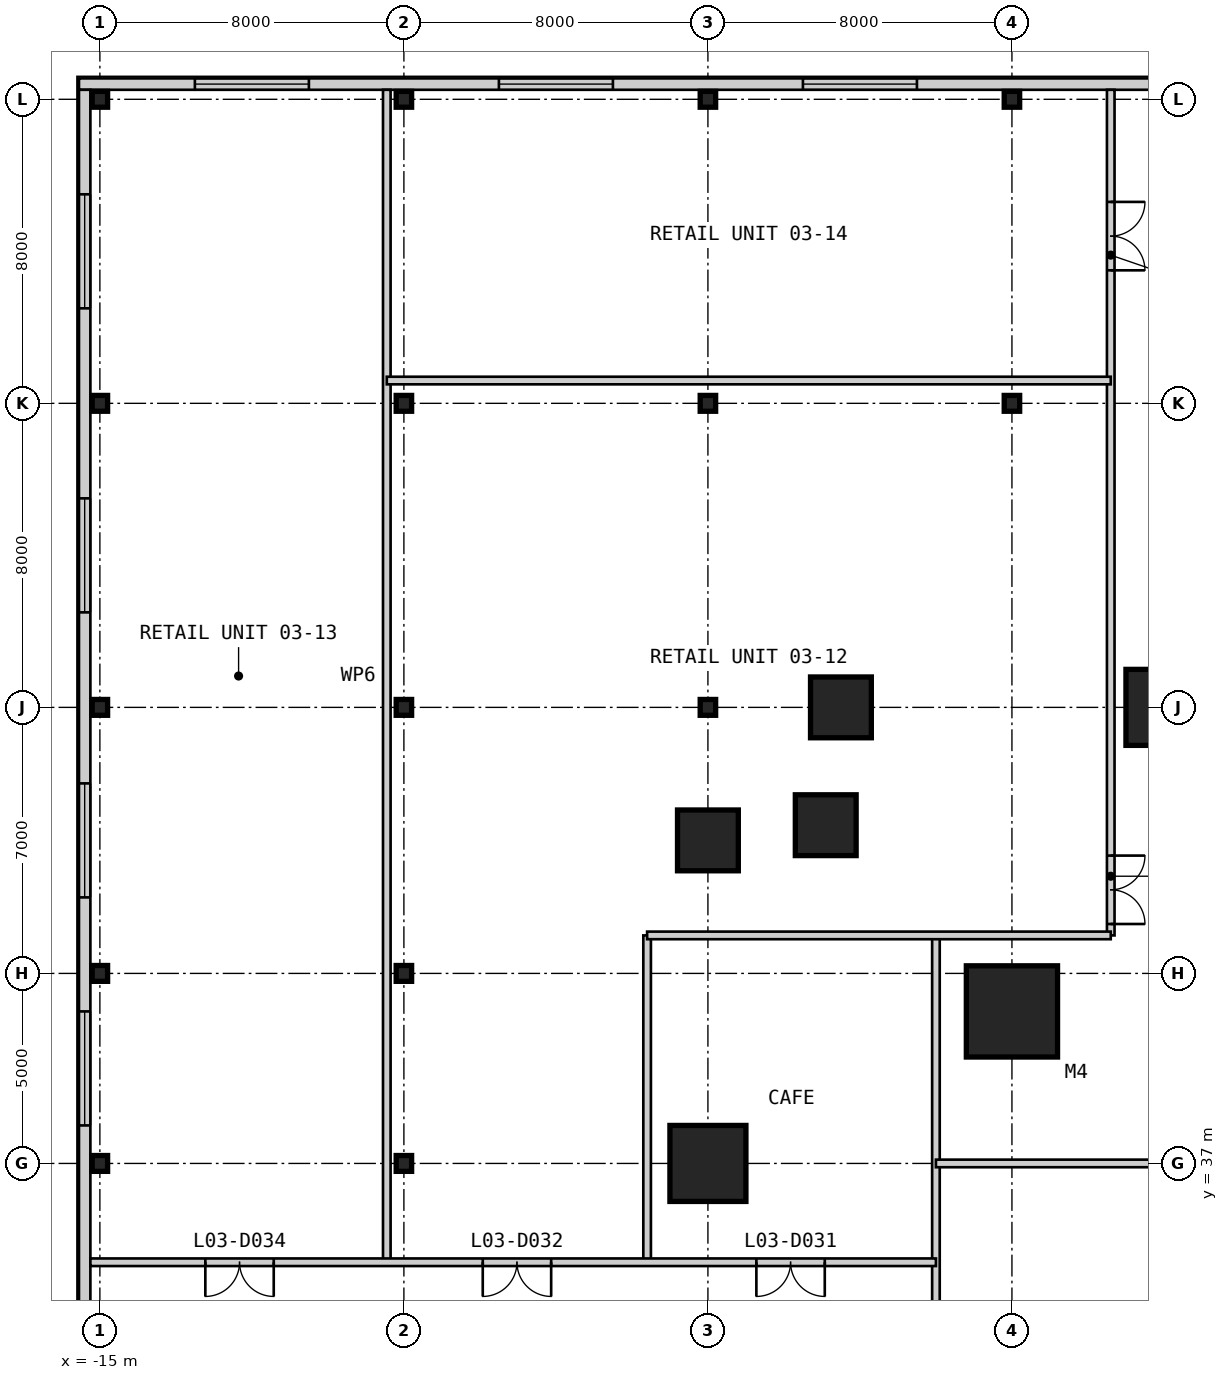
"""IFC4 building model, lengths in metres.
Left out: names, types, materials, properties, quantities, classifications, styles, units other than length and angle.
Written with IfcOpenShell. Run it as: python <this file> out.ifc"""

import sys

from ifc_helpers import new_model, si_unit, direction, frame, frame_2d, origin, origin_2d, place, context, subcontext, project, spatial, rectangle, i_section, extrude, element, fill, save


model = new_model("IFC4")
c1 = context("Model", 3, precision=1e-05, world=origin(), true_north=direction((0.0, 1.0)))
c2 = subcontext(c1, "Body", "Model", "MODEL_VIEW")
j1 = project(units=[si_unit("LENGTHUNIT", "METRE"), si_unit("PLANEANGLEUNIT", "RADIAN")], contexts=[c1])
p1 = place(None, origin())
s1 = spatial("IfcSite", under=j1, at=p1, CompositionType="ELEMENT")
p2 = place(p1, origin())
s2 = spatial("IfcBuilding", under=s1, at=p2, CompositionType="ELEMENT")
p3 = place(p2, frame((0.0, 0.0, 16.6)))
s3 = spatial("IfcBuildingStorey", under=s2, at=p3, CompositionType="ELEMENT", Elevation=16.6)
p4 = place(p3, frame((9.0, 41.0, 0.0), z_axis=(0.0, 0.0, 1.0), x_axis=(1.0, 0.0, 0.0)))
e1 = element("IfcColumn", 1, at=p4, inside=s3, PredefinedType="COLUMN", context=c2, shape_type="SweptSolid", body=[
    extrude(rectangle(XDim=2.4, YDim=2.4, at=origin_2d()), origin(), (0.0, 0.0, 1.0), 4.8),
])
p5 = place(p3, frame((13.0, 49.0, 0.0), z_axis=(0.0, 0.0, 1.0), x_axis=(1.0, 0.0, 0.0)))
e2 = element("IfcColumn", 2, at=p5, inside=s3, PredefinedType="COLUMN", context=c2, shape_type="SweptSolid", body=[
    extrude(rectangle(XDim=2.0, YDim=2.0, at=origin_2d()), origin(), (0.0, 0.0, 1.0), 4.8),
])
for number, where, z_axis, x_axis in (
    (3, (4.5, 49.0, 0.0), (0.0, 0.0, 1.0), (1.0, 0.0, 0.0)),
    (4, (4.1, 45.9, 0.0), (0.0, 0.0, 1.0), (1.0, 0.0, 0.0)),
    (5, (1.0, 45.5, 0.0), (0.0, 0.0, 1.0), (1.0, 0.0, 0.0)),
):
    element("IfcColumn", number, at=place(p3, frame(where, z_axis=z_axis, x_axis=x_axis)), inside=s3, PredefinedType="COLUMN", context=c2, shape_type="SweptSolid", body=[
        extrude(rectangle(XDim=1.6, YDim=1.6, at=origin_2d()), origin(), (0.0, 0.0, 1.0), 4.8),
    ])
p6 = place(p3, frame((1.0, 37.0, 0.0), z_axis=(0.0, 0.0, 1.0), x_axis=(1.0, 0.0, 0.0)))
e6 = element("IfcColumn", 6, at=p6, inside=s3, PredefinedType="COLUMN", context=c2, shape_type="SweptSolid", body=[
    extrude(rectangle(XDim=2.0, YDim=2.0, at=origin_2d()), origin(), (0.0, 0.0, 1.0), 4.8),
])
for number, where, z_axis, x_axis in (
    (7, (-15.0, 37.0, 0.0), (0.0, 0.0, 1.0), (1.0, 0.0, 0.0)),
    (8, (-15.0, 42.0, 0.0), (0.0, 0.0, 1.0), (1.0, 0.0, 0.0)),
    (9, (-15.0, 49.0, 0.0), (0.0, 0.0, 1.0), (1.0, 0.0, 0.0)),
    (10, (-15.0, 57.0, 0.0), (0.0, 0.0, 1.0), (1.0, 0.0, 0.0)),
    (11, (-15.0, 65.0, 0.0), (0.0, 0.0, 1.0), (1.0, 0.0, 0.0)),
    (12, (-7.0, 37.0, 0.0), (0.0, 0.0, 1.0), (1.0, 0.0, 0.0)),
    (13, (-7.0, 42.0, 0.0), (0.0, 0.0, 1.0), (1.0, 0.0, 0.0)),
    (14, (-7.0, 49.0, 0.0), (0.0, 0.0, 1.0), (1.0, 0.0, 0.0)),
    (15, (-7.0, 57.0, 0.0), (0.0, 0.0, 1.0), (1.0, 0.0, 0.0)),
    (16, (-7.0, 65.0, 0.0), (0.0, 0.0, 1.0), (1.0, 0.0, 0.0)),
    (17, (1.0, 49.0, 0.0), (0.0, 0.0, 1.0), (1.0, 0.0, 0.0)),
    (18, (1.0, 57.0, 0.0), (0.0, 0.0, 1.0), (1.0, 0.0, 0.0)),
    (19, (1.0, 65.0, 0.0), (0.0, 0.0, 1.0), (1.0, 0.0, 0.0)),
    (20, (9.0, 57.0, 0.0), (0.0, 0.0, 1.0), (1.0, 0.0, 0.0)),
    (21, (9.0, 65.0, 0.0), (0.0, 0.0, 1.0), (1.0, 0.0, 0.0)),
):
    element("IfcColumn", number, at=place(p3, frame(where, z_axis=z_axis, x_axis=x_axis)), inside=s3, PredefinedType="COLUMN", context=c2, shape_type="SweptSolid", body=[
        extrude(i_section(OverallWidth=0.406, OverallDepth=0.417, WebThickness=0.03, FlangeThickness=0.048, at=origin_2d()), origin(), (0.0, 0.0, 1.0), 4.8),
    ])
p7 = place(p3, frame((57.55, 65.4, 0.0), z_axis=(0.0, 0.0, 1.0), x_axis=(-1.0, 0.0, 0.0)))
e22 = element("IfcWall", 22, at=p7, inside=s3, PredefinedType="SOLIDWALL", context=c2, shape_type="SweptSolid", body=[
    extrude(rectangle(XDim=73.1, YDim=0.3, at=frame_2d((36.55, 0.0))), origin(), (0.0, 0.0, 1.0), 4.5),
])
p8 = place(p7, frame((67.05, 0.0, 0.9)))
e23 = element("IfcOpeningElement", 23, at=p8, cuts=e22, PredefinedType="OPENING", context=c2, shape_type="SweptSolid", body=[
    extrude(rectangle(XDim=3.0, YDim=2.4, at=frame_2d((1.5, 1.2))), frame((0.0, 0.16, 0.0), z_axis=(0.0, -1.0, 0.0), x_axis=(1.0, 0.0, 0.0)), (0.0, 0.0, 1.0), 0.32),
])
p9 = place(p7, frame((59.05, 0.0, 0.9)))
e24 = element("IfcOpeningElement", 24, at=p9, cuts=e22, PredefinedType="OPENING", context=c2, shape_type="SweptSolid", body=[
    extrude(rectangle(XDim=3.0, YDim=2.4, at=frame_2d((1.5, 1.2))), frame((0.0, 0.16, 0.0), z_axis=(0.0, -1.0, 0.0), x_axis=(1.0, 0.0, 0.0)), (0.0, 0.0, 1.0), 0.32),
])
p10 = place(p7, frame((51.05, 0.0, 0.9)))
e25 = element("IfcOpeningElement", 25, at=p10, cuts=e22, PredefinedType="OPENING", context=c2, shape_type="SweptSolid", body=[
    extrude(rectangle(XDim=3.0, YDim=2.4, at=frame_2d((1.5, 1.2))), frame((0.0, 0.16, 0.0), z_axis=(0.0, -1.0, 0.0), x_axis=(1.0, 0.0, 0.0)), (0.0, 0.0, 1.0), 0.32),
])
p11 = place(p7, frame((37.05, 0.0, 0.9)))
e26 = element("IfcOpeningElement", 26, at=p11, cuts=e22, PredefinedType="OPENING", context=c2, shape_type="SweptSolid", body=[
    extrude(rectangle(XDim=3.0, YDim=2.4, at=frame_2d((1.5, 1.2))), frame((0.0, 0.16, 0.0), z_axis=(0.0, -1.0, 0.0), x_axis=(1.0, 0.0, 0.0)), (0.0, 0.0, 1.0), 0.32),
])
p12 = place(p7, frame((25.05, 0.0, 0.9)))
e27 = element("IfcOpeningElement", 27, at=p12, cuts=e22, PredefinedType="OPENING", context=c2, shape_type="SweptSolid", body=[
    extrude(rectangle(XDim=3.0, YDim=2.4, at=frame_2d((1.5, 1.2))), frame((0.0, 0.16, 0.0), z_axis=(0.0, -1.0, 0.0), x_axis=(1.0, 0.0, 0.0)), (0.0, 0.0, 1.0), 0.32),
])
p13 = place(p7, frame((16.55, 0.0, 0.9)))
e28 = element("IfcOpeningElement", 28, at=p13, cuts=e22, PredefinedType="OPENING", context=c2, shape_type="SweptSolid", body=[
    extrude(rectangle(XDim=3.0, YDim=2.4, at=frame_2d((1.5, 1.2))), frame((0.0, 0.16, 0.0), z_axis=(0.0, -1.0, 0.0), x_axis=(1.0, 0.0, 0.0)), (0.0, 0.0, 1.0), 0.32),
])
p14 = place(p7, frame((10.55, 0.0, 0.9)))
e29 = element("IfcOpeningElement", 29, at=p14, cuts=e22, PredefinedType="OPENING", context=c2, shape_type="SweptSolid", body=[
    extrude(rectangle(XDim=3.0, YDim=2.4, at=frame_2d((1.5, 1.2))), frame((0.0, 0.16, 0.0), z_axis=(0.0, -1.0, 0.0), x_axis=(1.0, 0.0, 0.0)), (0.0, 0.0, 1.0), 0.32),
])
p15 = place(p7, frame((3.05, 0.0, 0.9)))
e30 = element("IfcOpeningElement", 30, at=p15, cuts=e22, PredefinedType="OPENING", context=c2, shape_type="SweptSolid", body=[
    extrude(rectangle(XDim=3.0, YDim=2.4, at=frame_2d((1.5, 1.2))), frame((0.0, 0.16, 0.0), z_axis=(0.0, -1.0, 0.0), x_axis=(1.0, 0.0, 0.0)), (0.0, 0.0, 1.0), 0.32),
])
p16 = place(p3, frame((-15.4, 65.25, 0.0), z_axis=(0.0, 0.0, 1.0), x_axis=(0.0, -1.0, 0.0)))
e31 = element("IfcWall", 31, at=p16, inside=s3, PredefinedType="SOLIDWALL", context=c2, shape_type="SweptSolid", body=[
    extrude(rectangle(XDim=72.5, YDim=0.3, at=frame_2d((36.25, 0.0))), origin(), (0.0, 0.0, 1.0), 4.5),
])
p17 = place(p16, frame((66.75, 0.0, 0.9)))
e32 = element("IfcOpeningElement", 32, at=p17, cuts=e31, PredefinedType="OPENING", context=c2, shape_type="SweptSolid", body=[
    extrude(rectangle(XDim=3.0, YDim=2.4, at=frame_2d((1.5, 1.2))), frame((0.0, 0.16, 0.0), z_axis=(0.0, -1.0, 0.0), x_axis=(1.0, 0.0, 0.0)), (0.0, 0.0, 1.0), 0.32),
])
p18 = place(p16, frame((58.75, 0.0, 0.9)))
e33 = element("IfcOpeningElement", 33, at=p18, cuts=e31, PredefinedType="OPENING", context=c2, shape_type="SweptSolid", body=[
    extrude(rectangle(XDim=3.0, YDim=2.4, at=frame_2d((1.5, 1.2))), frame((0.0, 0.16, 0.0), z_axis=(0.0, -1.0, 0.0), x_axis=(1.0, 0.0, 0.0)), (0.0, 0.0, 1.0), 0.32),
])
p19 = place(p16, frame((44.75, 0.0, 0.9)))
e34 = element("IfcOpeningElement", 34, at=p19, cuts=e31, PredefinedType="OPENING", context=c2, shape_type="SweptSolid", body=[
    extrude(rectangle(XDim=3.0, YDim=2.4, at=frame_2d((1.5, 1.2))), frame((0.0, 0.16, 0.0), z_axis=(0.0, -1.0, 0.0), x_axis=(1.0, 0.0, 0.0)), (0.0, 0.0, 1.0), 0.32),
])
p20 = place(p16, frame((32.75, 0.0, 0.9)))
e35 = element("IfcOpeningElement", 35, at=p20, cuts=e31, PredefinedType="OPENING", context=c2, shape_type="SweptSolid", body=[
    extrude(rectangle(XDim=3.0, YDim=2.4, at=frame_2d((1.5, 1.2))), frame((0.0, 0.16, 0.0), z_axis=(0.0, -1.0, 0.0), x_axis=(1.0, 0.0, 0.0)), (0.0, 0.0, 1.0), 0.32),
])
p21 = place(p16, frame((24.25, 0.0, 0.9)))
e36 = element("IfcOpeningElement", 36, at=p21, cuts=e31, PredefinedType="OPENING", context=c2, shape_type="SweptSolid", body=[
    extrude(rectangle(XDim=3.0, YDim=2.4, at=frame_2d((1.5, 1.2))), frame((0.0, 0.16, 0.0), z_axis=(0.0, -1.0, 0.0), x_axis=(1.0, 0.0, 0.0)), (0.0, 0.0, 1.0), 0.32),
])
p22 = place(p16, frame((18.25, 0.0, 0.9)))
e37 = element("IfcOpeningElement", 37, at=p22, cuts=e31, PredefinedType="OPENING", context=c2, shape_type="SweptSolid", body=[
    extrude(rectangle(XDim=3.0, YDim=2.4, at=frame_2d((1.5, 1.2))), frame((0.0, 0.16, 0.0), z_axis=(0.0, -1.0, 0.0), x_axis=(1.0, 0.0, 0.0)), (0.0, 0.0, 1.0), 0.32),
])
p23 = place(p16, frame((10.75, 0.0, 0.9)))
e38 = element("IfcOpeningElement", 38, at=p23, cuts=e31, PredefinedType="OPENING", context=c2, shape_type="SweptSolid", body=[
    extrude(rectangle(XDim=3.0, YDim=2.4, at=frame_2d((1.5, 1.2))), frame((0.0, 0.16, 0.0), z_axis=(0.0, -1.0, 0.0), x_axis=(1.0, 0.0, 0.0)), (0.0, 0.0, 1.0), 0.32),
])
p24 = place(p16, frame((2.75, 0.0, 0.9)))
e39 = element("IfcOpeningElement", 39, at=p24, cuts=e31, PredefinedType="OPENING", context=c2, shape_type="SweptSolid", body=[
    extrude(rectangle(XDim=3.0, YDim=2.4, at=frame_2d((1.5, 1.2))), frame((0.0, 0.16, 0.0), z_axis=(0.0, -1.0, 0.0), x_axis=(1.0, 0.0, 0.0)), (0.0, 0.0, 1.0), 0.32),
])
p25 = place(p3, frame((-7.45, 34.4, 0.0), z_axis=(0.0, 0.0, 1.0), x_axis=(0.0, 1.0, 0.0)))
e40 = element("IfcWall", 40, at=p25, inside=s3, PredefinedType="PARTITIONING", context=c2, shape_type="SweptSolid", body=[
    extrude(rectangle(XDim=30.85, YDim=0.2, at=frame_2d((15.425, 0.0))), origin(), (0.0, 0.0, 1.0), 4.5),
])
p26 = place(p3, frame((-0.6, 34.4, 0.0), z_axis=(0.0, 0.0, 1.0), x_axis=(0.0, 1.0, 0.0)))
e41 = element("IfcWall", 41, at=p26, inside=s3, PredefinedType="PARTITIONING", context=c2, shape_type="SweptSolid", body=[
    extrude(rectangle(XDim=8.6, YDim=0.2, at=frame_2d((4.3, 0.0))), origin(), (0.0, 0.0, 1.0), 4.5),
])
p27 = place(p3, frame((7.0, 22.0, 0.0), z_axis=(0.0, 0.0, 1.0), x_axis=(0.0, 1.0, 0.0)))
e42 = element("IfcWall", 42, at=p27, inside=s3, PredefinedType="PARTITIONING", context=c2, shape_type="SweptSolid", body=[
    extrude(rectangle(XDim=21.0, YDim=0.2, at=frame_2d((10.5, 0.0))), origin(), (0.0, 0.0, 1.0), 3.843),
])
p28 = place(p3, frame((11.6, 43.0, 0.0), z_axis=(0.0, 0.0, 1.0), x_axis=(0.0, 1.0, 0.0)))
e43 = element("IfcWall", 43, at=p28, inside=s3, PredefinedType="PARTITIONING", context=c2, shape_type="SweptSolid", body=[
    extrude(rectangle(XDim=22.25, YDim=0.2, at=frame_2d((11.125, 0.0))), origin(), (0.0, 0.0, 1.0), 4.5),
])
p29 = place(p28, frame((0.3, 0.0, 0.0)))
e44 = element("IfcOpeningElement", 44, at=p29, cuts=e43, PredefinedType="OPENING", context=c2, shape_type="SweptSolid", body=[
    extrude(rectangle(XDim=1.8, YDim=2.4, at=frame_2d((0.9, 1.2))), frame((0.0, 0.11, 0.0), z_axis=(0.0, -1.0, 0.0), x_axis=(1.0, 0.0, 0.0)), (0.0, 0.0, 1.0), 0.22),
])
p30 = place(p28, frame((17.5, 0.0, 0.0)))
e45 = element("IfcOpeningElement", 45, at=p30, cuts=e43, PredefinedType="OPENING", context=c2, shape_type="SweptSolid", body=[
    extrude(rectangle(XDim=1.8, YDim=2.4, at=frame_2d((0.9, 1.2))), frame((0.0, 0.11, 0.0), z_axis=(0.0, -1.0, 0.0), x_axis=(1.0, 0.0, 0.0)), (0.0, 0.0, 1.0), 0.22),
])
p31 = place(p3, frame((-15.25, 34.4, 0.0), z_axis=(0.0, 0.0, 1.0), x_axis=(1.0, 0.0, 0.0)))
e46 = element("IfcWall", 46, at=p31, inside=s3, PredefinedType="PARTITIONING", context=c2, shape_type="SweptSolid", body=[
    extrude(rectangle(XDim=22.25, YDim=0.2, at=frame_2d((11.125, 0.0))), origin(), (0.0, 0.0, 1.0), 4.5),
])
p32 = place(p31, frame((17.525, 0.0, 0.0)))
e47 = element("IfcOpeningElement", 47, at=p32, cuts=e46, PredefinedType="OPENING", context=c2, shape_type="SweptSolid", body=[
    extrude(rectangle(XDim=1.8, YDim=2.4, at=frame_2d((0.9, 1.2))), frame((0.0, 0.11, 0.0), z_axis=(0.0, -1.0, 0.0), x_axis=(1.0, 0.0, 0.0)), (0.0, 0.0, 1.0), 0.22),
])
p33 = place(p31, frame((10.325, 0.0, 0.0)))
e48 = element("IfcOpeningElement", 48, at=p33, cuts=e46, PredefinedType="OPENING", context=c2, shape_type="SweptSolid", body=[
    extrude(rectangle(XDim=1.8, YDim=2.4, at=frame_2d((0.9, 1.2))), frame((0.0, 0.11, 0.0), z_axis=(0.0, -1.0, 0.0), x_axis=(1.0, 0.0, 0.0)), (0.0, 0.0, 1.0), 0.22),
])
p34 = place(p31, frame((3.025, 0.0, 0.0)))
e49 = element("IfcOpeningElement", 49, at=p34, cuts=e46, PredefinedType="OPENING", context=c2, shape_type="SweptSolid", body=[
    extrude(rectangle(XDim=1.8, YDim=2.4, at=frame_2d((0.9, 1.2))), frame((0.0, 0.11, 0.0), z_axis=(0.0, -1.0, 0.0), x_axis=(1.0, 0.0, 0.0)), (0.0, 0.0, 1.0), 0.22),
])
p35 = place(p3, frame((7.0, 37.0, 0.0), z_axis=(0.0, 0.0, 1.0), x_axis=(1.0, 0.0, 0.0)))
e50 = element("IfcWall", 50, at=p35, inside=s3, PredefinedType="PARTITIONING", context=c2, shape_type="SweptSolid", body=[
    extrude(rectangle(XDim=6.0, YDim=0.2, at=frame_2d((3.0, 0.0))), origin(), (0.0, 0.0, 1.0), 3.653),
])
p36 = place(p3, frame((-0.6, 43.0, 0.0), z_axis=(0.0, 0.0, 1.0), x_axis=(1.0, 0.0, 0.0)))
e51 = element("IfcWall", 51, at=p36, inside=s3, PredefinedType="PARTITIONING", context=c2, shape_type="SweptSolid", body=[
    extrude(rectangle(XDim=12.2, YDim=0.2, at=frame_2d((6.1, 0.0))), origin(), (0.0, 0.0, 1.0), 4.5),
])
p37 = place(p3, frame((-7.45, 57.6, 0.0), z_axis=(0.0, 0.0, 1.0), x_axis=(1.0, 0.0, 0.0)))
e52 = element("IfcWall", 52, at=p37, inside=s3, PredefinedType="PARTITIONING", context=c2, shape_type="SweptSolid", body=[
    extrude(rectangle(XDim=19.05, YDim=0.2, at=frame_2d((9.525, 0.0))), origin(), (0.0, 0.0, 1.0), 4.5),
])
p38 = place(p8, origin())
e53 = element("IfcWindow", 53, at=p38, inside=s3, PartitioningType="SINGLE_PANEL", PredefinedType="WINDOW", context=c2, shape_type="SweptSolid", body=[
    extrude(rectangle(XDim=3.0, YDim=2.4, at=frame_2d((1.5, 1.2))), frame((0.0, 0.03, 0.0), z_axis=(0.0, -1.0, 0.0), x_axis=(1.0, 0.0, 0.0)), (0.0, 0.0, 1.0), 0.06),
])
fill(e23, e53)
p39 = place(p9, origin())
e54 = element("IfcWindow", 54, at=p39, inside=s3, PartitioningType="SINGLE_PANEL", PredefinedType="WINDOW", context=c2, shape_type="SweptSolid", body=[
    extrude(rectangle(XDim=3.0, YDim=2.4, at=frame_2d((1.5, 1.2))), frame((0.0, 0.03, 0.0), z_axis=(0.0, -1.0, 0.0), x_axis=(1.0, 0.0, 0.0)), (0.0, 0.0, 1.0), 0.06),
])
fill(e24, e54)
p40 = place(p10, origin())
e55 = element("IfcWindow", 55, at=p40, inside=s3, PartitioningType="SINGLE_PANEL", PredefinedType="WINDOW", context=c2, shape_type="SweptSolid", body=[
    extrude(rectangle(XDim=3.0, YDim=2.4, at=frame_2d((1.5, 1.2))), frame((0.0, 0.03, 0.0), z_axis=(0.0, -1.0, 0.0), x_axis=(1.0, 0.0, 0.0)), (0.0, 0.0, 1.0), 0.06),
])
fill(e25, e55)
p41 = place(p21, origin())
e56 = element("IfcWindow", 56, at=p41, inside=s3, PartitioningType="SINGLE_PANEL", PredefinedType="WINDOW", context=c2, shape_type="SweptSolid", body=[
    extrude(rectangle(XDim=3.0, YDim=2.4, at=frame_2d((1.5, 1.2))), frame((0.0, 0.03, 0.0), z_axis=(0.0, -1.0, 0.0), x_axis=(1.0, 0.0, 0.0)), (0.0, 0.0, 1.0), 0.06),
])
fill(e36, e56)
p42 = place(p22, origin())
e57 = element("IfcWindow", 57, at=p42, inside=s3, PartitioningType="SINGLE_PANEL", PredefinedType="WINDOW", context=c2, shape_type="SweptSolid", body=[
    extrude(rectangle(XDim=3.0, YDim=2.4, at=frame_2d((1.5, 1.2))), frame((0.0, 0.03, 0.0), z_axis=(0.0, -1.0, 0.0), x_axis=(1.0, 0.0, 0.0)), (0.0, 0.0, 1.0), 0.06),
])
fill(e37, e57)
p43 = place(p23, origin())
e58 = element("IfcWindow", 58, at=p43, inside=s3, PartitioningType="SINGLE_PANEL", PredefinedType="WINDOW", context=c2, shape_type="SweptSolid", body=[
    extrude(rectangle(XDim=3.0, YDim=2.4, at=frame_2d((1.5, 1.2))), frame((0.0, 0.03, 0.0), z_axis=(0.0, -1.0, 0.0), x_axis=(1.0, 0.0, 0.0)), (0.0, 0.0, 1.0), 0.06),
])
fill(e38, e58)
p44 = place(p24, origin())
e59 = element("IfcWindow", 59, at=p44, inside=s3, PartitioningType="SINGLE_PANEL", PredefinedType="WINDOW", context=c2, shape_type="SweptSolid", body=[
    extrude(rectangle(XDim=3.0, YDim=2.4, at=frame_2d((1.5, 1.2))), frame((0.0, 0.03, 0.0), z_axis=(0.0, -1.0, 0.0), x_axis=(1.0, 0.0, 0.0)), (0.0, 0.0, 1.0), 0.06),
])
fill(e39, e59)
p45 = place(p32, frame((1.8, 0.0, 0.0), z_axis=(0.0, 0.0, 1.0), x_axis=(-1.0, 0.0, 0.0)))
e60 = element("IfcDoor", 60, at=p45, inside=s3, OperationType="DOUBLE_DOOR_SINGLE_SWING", PredefinedType="DOOR", context=c2, shape_type="SweptSolid", body=[
    extrude(rectangle(XDim=1.8, YDim=2.4, at=frame_2d((0.9, 1.2))), frame((0.0, 0.025, 0.0), z_axis=(0.0, -1.0, 0.0), x_axis=(1.0, 0.0, 0.0)), (0.0, 0.0, 1.0), 0.05),
])
fill(e47, e60)
p46 = place(p33, frame((1.8, 0.0, 0.0), z_axis=(0.0, 0.0, 1.0), x_axis=(-1.0, 0.0, 0.0)))
e61 = element("IfcDoor", 61, at=p46, inside=s3, OperationType="DOUBLE_DOOR_SINGLE_SWING", PredefinedType="DOOR", context=c2, shape_type="SweptSolid", body=[
    extrude(rectangle(XDim=1.8, YDim=2.4, at=frame_2d((0.9, 1.2))), frame((0.0, 0.025, 0.0), z_axis=(0.0, -1.0, 0.0), x_axis=(1.0, 0.0, 0.0)), (0.0, 0.0, 1.0), 0.05),
])
fill(e48, e61)
p47 = place(p29, frame((1.8, 0.0, 0.0), z_axis=(0.0, 0.0, 1.0), x_axis=(-1.0, 0.0, 0.0)))
e62 = element("IfcDoor", 62, at=p47, inside=s3, OperationType="DOUBLE_DOOR_SINGLE_SWING", PredefinedType="DOOR", context=c2, shape_type="SweptSolid", body=[
    extrude(rectangle(XDim=1.8, YDim=2.4, at=frame_2d((0.9, 1.2))), frame((0.0, 0.025, 0.0), z_axis=(0.0, -1.0, 0.0), x_axis=(1.0, 0.0, 0.0)), (0.0, 0.0, 1.0), 0.05),
])
fill(e44, e62)
p48 = place(p34, frame((1.8, 0.0, 0.0), z_axis=(0.0, 0.0, 1.0), x_axis=(-1.0, 0.0, 0.0)))
e63 = element("IfcDoor", 63, at=p48, inside=s3, OperationType="DOUBLE_DOOR_SINGLE_SWING", PredefinedType="DOOR", context=c2, shape_type="SweptSolid", body=[
    extrude(rectangle(XDim=1.8, YDim=2.4, at=frame_2d((0.9, 1.2))), frame((0.0, 0.025, 0.0), z_axis=(0.0, -1.0, 0.0), x_axis=(1.0, 0.0, 0.0)), (0.0, 0.0, 1.0), 0.05),
])
fill(e49, e63)
p49 = place(p30, frame((1.8, 0.0, 0.0), z_axis=(0.0, 0.0, 1.0), x_axis=(-1.0, 0.0, 0.0)))
e64 = element("IfcDoor", 64, at=p49, inside=s3, OperationType="DOUBLE_DOOR_SINGLE_SWING", PredefinedType="DOOR", context=c2, shape_type="SweptSolid", body=[
    extrude(rectangle(XDim=1.8, YDim=2.4, at=frame_2d((0.9, 1.2))), frame((0.0, 0.025, 0.0), z_axis=(0.0, -1.0, 0.0), x_axis=(1.0, 0.0, 0.0)), (0.0, 0.0, 1.0), 0.05),
])
fill(e45, e64)
save(model, sys.argv[1])
